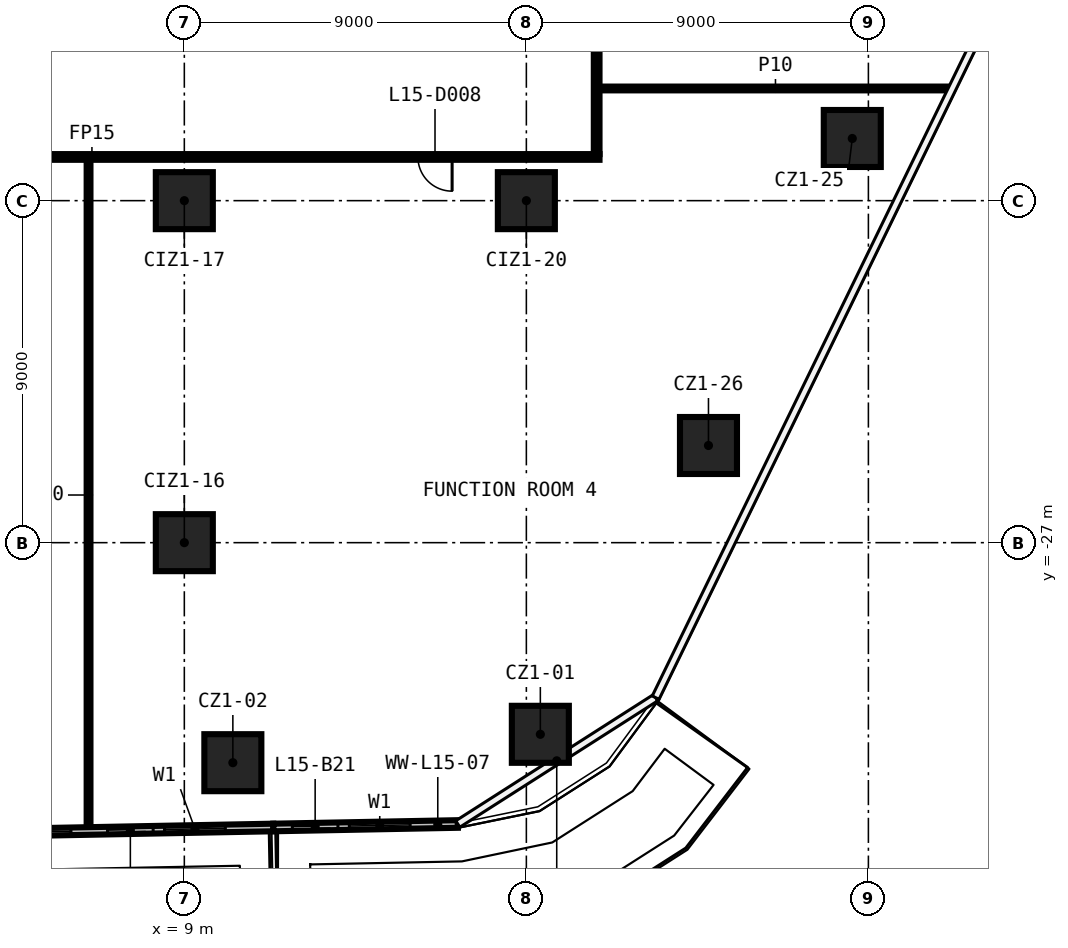
"""IFC4 building model, lengths in metres.
Left out: names, types, materials, properties, quantities, classifications, styles, units other than length and angle.
Written with IfcOpenShell. Run it as: python <this file> out.ifc"""

import sys

from ifc_helpers import new_model, si_unit, direction, frame, frame_2d, origin, origin_2d, place, context, subcontext, project, spatial, rectangle, extrude, element, fill, save


model = new_model("IFC4")
c1 = context("Model", 3, precision=1e-05, world=origin(), true_north=direction((0.0, 1.0)))
c2 = subcontext(c1, "Body", "Model", "MODEL_VIEW")
j1 = project(units=[si_unit("LENGTHUNIT", "METRE"), si_unit("PLANEANGLEUNIT", "RADIAN")], contexts=[c1])
p1 = place(None, origin())
s1 = spatial("IfcSite", under=j1, at=p1, CompositionType="ELEMENT")
p2 = place(p1, origin())
s2 = spatial("IfcBuilding", under=s1, at=p2, CompositionType="ELEMENT")
p3 = place(p2, frame((0.0, 0.0, 77.3)))
s3 = spatial("IfcBuildingStorey", under=s2, at=p3, CompositionType="ELEMENT", Elevation=77.3)
for number, where, z_axis, x_axis in (
    (1, (18.368, -32.043, 0.0), (0.0, 0.0, 1.0), (1.0, 0.0, 0.0)),
    (2, (10.277, -32.79, 0.0), (0.0, 0.0, 1.0), (1.0, 0.0, 0.0)),
    (3, (26.576, -16.364, 0.0), (0.0, 0.0, 1.0), (1.0, 0.0, 0.0)),
    (4, (22.792, -24.443, 0.0), (0.0, 0.0, 1.0), (1.0, 0.0, 0.0)),
    (5, (9.0, -27.0, 0.0), (0.0, 0.0, 1.0), (1.0, 0.0, 0.0)),
    (6, (9.0, -18.0, 0.0), (0.0, 0.0, 1.0), (1.0, 0.0, 0.0)),
    (7, (18.0, -18.0, 0.0), (0.0, 0.0, 1.0), (1.0, 0.0, 0.0)),
):
    element("IfcColumn", number, at=place(p3, frame(where, z_axis=z_axis, x_axis=x_axis)), inside=s3, PredefinedType="COLUMN", context=c2, shape_type="SweptSolid", body=[
        extrude(rectangle(XDim=1.5, YDim=1.5, at=origin_2d()), origin(), (0.0, 0.0, 1.0), 3.3),
    ])
p4 = place(p3, frame((19.925, -16.85, 0.0), z_axis=(0.0, 0.0, 1.0), x_axis=(-1.0, 0.0, 0.0)))
e8 = element("IfcWall", 8, at=p4, inside=s3, PredefinedType="PARTITIONING", context=c2, shape_type="SweptSolid", body=[
    extrude(rectangle(XDim=39.85, YDim=0.15, at=frame_2d((19.925, 0.0))), origin(), (0.0, 0.0, 1.0), 3.3),
])
p5 = place(p4, frame((35.06, 0.0, 0.0)))
e9 = element("IfcOpeningElement", 9, at=p5, cuts=e8, PredefinedType="OPENING", context=c2, shape_type="SweptSolid", body=[
    extrude(rectangle(XDim=0.9, YDim=2.1, at=frame_2d((0.45, 1.05))), frame((0.0, 0.085, 0.0), z_axis=(0.0, -1.0, 0.0), x_axis=(1.0, 0.0, 0.0)), (0.0, 0.0, 1.0), 0.17),
])
p6 = place(p4, frame((30.967, 0.0, 0.0)))
e10 = element("IfcOpeningElement", 10, at=p6, cuts=e8, PredefinedType="OPENING", context=c2, shape_type="SweptSolid", body=[
    extrude(rectangle(XDim=1.0, YDim=2.1, at=frame_2d((0.5, 1.05))), frame((0.0, 0.085, 0.0), z_axis=(0.0, -1.0, 0.0), x_axis=(1.0, 0.0, 0.0)), (0.0, 0.0, 1.0), 0.17),
])
p7 = place(p4, frame((21.934, 0.0, 0.0)))
e11 = element("IfcOpeningElement", 11, at=p7, cuts=e8, PredefinedType="OPENING", context=c2, shape_type="SweptSolid", body=[
    extrude(rectangle(XDim=0.9, YDim=2.1, at=frame_2d((0.45, 1.05))), frame((0.0, 0.085, 0.0), z_axis=(0.0, -1.0, 0.0), x_axis=(1.0, 0.0, 0.0)), (0.0, 0.0, 1.0), 0.17),
])
p8 = place(p4, frame((3.879, 0.0, 0.0)))
e12 = element("IfcOpeningElement", 12, at=p8, cuts=e8, PredefinedType="OPENING", context=c2, shape_type="SweptSolid", body=[
    extrude(rectangle(XDim=0.9, YDim=2.1, at=frame_2d((0.45, 1.05))), frame((0.0, 0.085, 0.0), z_axis=(0.0, -1.0, 0.0), x_axis=(1.0, 0.0, 0.0)), (0.0, 0.0, 1.0), 0.17),
])
p9 = place(p3, frame((19.925, -15.048, 0.0), z_axis=(0.0, 0.0, 1.0), x_axis=(1.0, 0.0, 0.0)))
e13 = element("IfcWall", 13, at=p9, inside=s3, PredefinedType="PARTITIONING", context=c2, shape_type="SweptSolid", body=[
    extrude(rectangle(XDim=9.26, YDim=0.1, at=frame_2d((4.63, 0.0))), origin(), (0.0, 0.0, 1.0), 3.3),
])
p10 = place(p3, frame((19.85, 16.775, 0.0), z_axis=(0.0, 0.0, 1.0), x_axis=(0.0, -1.0, 0.0)))
e14 = element("IfcWall", 14, at=p10, inside=s3, PredefinedType="PARTITIONING", context=c2, shape_type="SweptSolid", body=[
    extrude(rectangle(XDim=33.55, YDim=0.15, at=frame_2d((16.775, 0.0))), origin(), (0.0, 0.0, 1.0), 3.3),
])
p11 = place(p10, frame((14.19, 0.0, 0.0)))
e15 = element("IfcOpeningElement", 15, at=p11, cuts=e14, PredefinedType="OPENING", context=c2, shape_type="SweptSolid", body=[
    extrude(rectangle(XDim=0.9, YDim=2.1, at=frame_2d((0.45, 1.05))), frame((0.0, 0.085, 0.0), z_axis=(0.0, -1.0, 0.0), x_axis=(1.0, 0.0, 0.0)), (0.0, 0.0, 1.0), 0.17),
])
p12 = place(p3, frame((6.48, -34.567, 0.0), z_axis=(0.0, 0.0, 1.0), x_axis=(0.0, 1.0, 0.0)))
e16 = element("IfcWall", 16, at=p12, inside=s3, PredefinedType="PARTITIONING", context=c2, shape_type="SweptSolid", body=[
    extrude(rectangle(XDim=17.642, YDim=0.1, at=frame_2d((8.821, 0.0))), origin(), (0.0, 0.0, 1.0), 3.3),
])
p13 = place(p3, frame((-3.245, -34.771, 0.0), z_axis=(0.0, 0.0, 1.0), x_axis=(0.99982027527, 0.018958300507, 0.0)))
e17 = element("IfcWall", 17, at=p13, inside=s3, PredefinedType="SOLIDWALL", context=c2, shape_type="SweptSolid", body=[
    extrude(rectangle(XDim=14.591, YDim=0.2, at=frame_2d((7.295, 0.0))), origin(), (0.0, 0.0, 1.0), 3.3),
])
p14 = place(p13, frame((2.0, 0.0, 0.6)))
e18 = element("IfcOpeningElement", 18, at=p14, cuts=e17, PredefinedType="OPENING", context=c2, shape_type="SweptSolid", body=[
    extrude(rectangle(XDim=1.6, YDim=2.4, at=frame_2d((0.8, 1.2))), frame((0.0, 0.11, 0.0), z_axis=(0.0, -1.0, 0.0), x_axis=(1.0, 0.0, 0.0)), (0.0, 0.0, 1.0), 0.22),
])
p15 = place(p13, frame((0.5, 0.0, 0.0)))
e19 = element("IfcOpeningElement", 19, at=p15, cuts=e17, PredefinedType="OPENING", context=c2, shape_type="SweptSolid", body=[
    extrude(rectangle(XDim=1.2, YDim=2.4, at=frame_2d((0.6, 1.2))), frame((0.0, 0.11, 0.0), z_axis=(0.0, -1.0, 0.0), x_axis=(1.0, 0.0, 0.0)), (0.0, 0.0, 1.0), 0.22),
])
p16 = place(p13, frame((7.664, 0.0, 0.6)))
e20 = element("IfcOpeningElement", 20, at=p16, cuts=e17, PredefinedType="OPENING", context=c2, shape_type="SweptSolid", body=[
    extrude(rectangle(XDim=1.6, YDim=2.4, at=frame_2d((0.8, 1.2))), frame((0.0, 0.11, 0.0), z_axis=(0.0, -1.0, 0.0), x_axis=(1.0, 0.0, 0.0)), (0.0, 0.0, 1.0), 0.22),
])
p17 = place(p13, frame((6.164, 0.0, 0.0)))
e21 = element("IfcOpeningElement", 21, at=p17, cuts=e17, PredefinedType="OPENING", context=c2, shape_type="SweptSolid", body=[
    extrude(rectangle(XDim=1.2, YDim=2.4, at=frame_2d((0.6, 1.2))), frame((0.0, 0.11, 0.0), z_axis=(0.0, -1.0, 0.0), x_axis=(1.0, 0.0, 0.0)), (0.0, 0.0, 1.0), 0.22),
])
p18 = place(p13, frame((11.727, 0.0, 0.6)))
e22 = element("IfcOpeningElement", 22, at=p18, cuts=e17, PredefinedType="OPENING", context=c2, shape_type="SweptSolid", body=[
    extrude(rectangle(XDim=1.6, YDim=2.4, at=frame_2d((0.8, 1.2))), frame((0.0, 0.11, 0.0), z_axis=(0.0, -1.0, 0.0), x_axis=(1.0, 0.0, 0.0)), (0.0, 0.0, 1.0), 0.22),
])
p19 = place(p13, frame((10.227, 0.0, 0.0)))
e23 = element("IfcOpeningElement", 23, at=p19, cuts=e17, PredefinedType="OPENING", context=c2, shape_type="SweptSolid", body=[
    extrude(rectangle(XDim=1.2, YDim=2.4, at=frame_2d((0.6, 1.2))), frame((0.0, 0.11, 0.0), z_axis=(0.0, -1.0, 0.0), x_axis=(1.0, 0.0, 0.0)), (0.0, 0.0, 1.0), 0.22),
])
p20 = place(p3, frame((11.343, -34.495, 0.0), z_axis=(0.0, 0.0, 1.0), x_axis=(0.999821170107, 0.01891104985, 0.0)))
e24 = element("IfcWall", 24, at=p20, inside=s3, PredefinedType="SOLIDWALL", context=c2, shape_type="SweptSolid", body=[
    extrude(rectangle(XDim=4.854, YDim=0.2, at=frame_2d((2.427, 0.0))), origin(), (0.0, 0.0, 1.0), 3.3),
])
p21 = place(p20, frame((2.0, 0.0, 0.6)))
e25 = element("IfcOpeningElement", 25, at=p21, cuts=e24, PredefinedType="OPENING", context=c2, shape_type="SweptSolid", body=[
    extrude(rectangle(XDim=1.6, YDim=2.4, at=frame_2d((0.8, 1.2))), frame((0.0, 0.11, 0.0), z_axis=(0.0, -1.0, 0.0), x_axis=(1.0, 0.0, 0.0)), (0.0, 0.0, 1.0), 0.22),
])
p22 = place(p20, frame((0.5, 0.0, 0.0)))
e26 = element("IfcOpeningElement", 26, at=p22, cuts=e24, PredefinedType="OPENING", context=c2, shape_type="SweptSolid", body=[
    extrude(rectangle(XDim=1.2, YDim=2.4, at=frame_2d((0.6, 1.2))), frame((0.0, 0.11, 0.0), z_axis=(0.0, -1.0, 0.0), x_axis=(1.0, 0.0, 0.0)), (0.0, 0.0, 1.0), 0.22),
])
p23 = place(p8, origin())
e27 = element("IfcDoor", 27, at=p23, inside=s3, OperationType="SINGLE_SWING_LEFT", PredefinedType="DOOR", context=c2, shape_type="SweptSolid", body=[
    extrude(rectangle(XDim=0.9, YDim=2.1, at=frame_2d((0.45, 1.05))), frame((0.0, 0.025, 0.0), z_axis=(0.0, -1.0, 0.0), x_axis=(1.0, 0.0, 0.0)), (0.0, 0.0, 1.0), 0.05),
])
fill(e12, e27)
p24 = place(p16, origin())
e28 = element("IfcWindow", 28, at=p24, inside=s3, PartitioningType="SINGLE_PANEL", PredefinedType="WINDOW", context=c2, shape_type="SweptSolid", body=[
    extrude(rectangle(XDim=1.6, YDim=2.4, at=frame_2d((0.8, 1.2))), frame((0.0, 0.03, 0.0), z_axis=(0.0, -1.0, 0.0), x_axis=(1.0, 0.0, 0.0)), (0.0, 0.0, 1.0), 0.06),
])
fill(e20, e28)
p25 = place(p18, origin())
e29 = element("IfcWindow", 29, at=p25, inside=s3, PartitioningType="SINGLE_PANEL", PredefinedType="WINDOW", context=c2, shape_type="SweptSolid", body=[
    extrude(rectangle(XDim=1.6, YDim=2.4, at=frame_2d((0.8, 1.2))), frame((0.0, 0.03, 0.0), z_axis=(0.0, -1.0, 0.0), x_axis=(1.0, 0.0, 0.0)), (0.0, 0.0, 1.0), 0.06),
])
fill(e22, e29)
p26 = place(p19, origin())
e30 = element("IfcDoor", 30, at=p26, inside=s3, OperationType="SLIDING_TO_LEFT", PredefinedType="DOOR", context=c2, shape_type="SweptSolid", body=[
    extrude(rectangle(XDim=1.2, YDim=2.4, at=frame_2d((0.6, 1.2))), frame((0.0, 0.025, 0.0), z_axis=(0.0, -1.0, 0.0), x_axis=(1.0, 0.0, 0.0)), (0.0, 0.0, 1.0), 0.05),
])
fill(e23, e30)
p27 = place(p21, origin())
e31 = element("IfcWindow", 31, at=p27, inside=s3, PartitioningType="SINGLE_PANEL", PredefinedType="WINDOW", context=c2, shape_type="SweptSolid", body=[
    extrude(rectangle(XDim=1.6, YDim=2.4, at=frame_2d((0.8, 1.2))), frame((0.0, 0.03, 0.0), z_axis=(0.0, -1.0, 0.0), x_axis=(1.0, 0.0, 0.0)), (0.0, 0.0, 1.0), 0.06),
])
fill(e25, e31)
p28 = place(p22, origin())
e32 = element("IfcDoor", 32, at=p28, inside=s3, OperationType="SLIDING_TO_LEFT", PredefinedType="DOOR", context=c2, shape_type="SweptSolid", body=[
    extrude(rectangle(XDim=1.2, YDim=2.4, at=frame_2d((0.6, 1.2))), frame((0.0, 0.025, 0.0), z_axis=(0.0, -1.0, 0.0), x_axis=(1.0, 0.0, 0.0)), (0.0, 0.0, 1.0), 0.05),
])
fill(e26, e32)
save(model, sys.argv[1])
